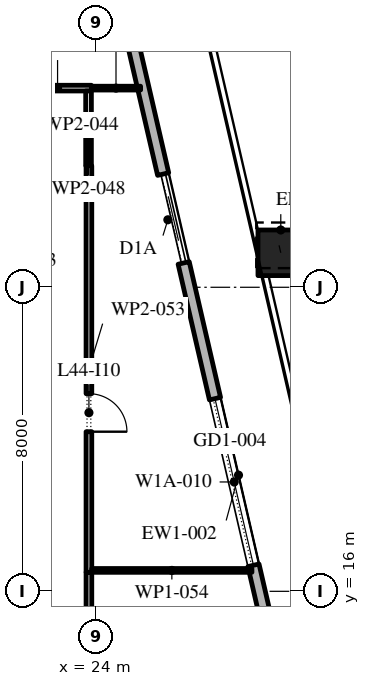
"""IFC4 building model, lengths in metres.
Left out: names, types, materials, properties, quantities, classifications, styles, units other than length and angle.
Written with IfcOpenShell. Run it as: python <this file> out.ifc"""

import sys

from ifc_helpers import new_model, si_unit, direction, frame, frame_2d, origin, origin_2d, place, context, subcontext, project, spatial, rectangle, extrude, element, fill, save


model = new_model("IFC4")
c1 = context("Model", 3, precision=1e-05, world=origin(), true_north=direction((0.0, 1.0)))
c2 = subcontext(c1, "Body", "Model", "MODEL_VIEW")
j1 = project(units=[si_unit("LENGTHUNIT", "METRE"), si_unit("PLANEANGLEUNIT", "RADIAN")], contexts=[c1])
p1 = place(None, origin())
s1 = spatial("IfcSite", under=j1, at=p1, CompositionType="ELEMENT")
p2 = place(p1, origin())
s2 = spatial("IfcBuilding", under=s1, at=p2, CompositionType="ELEMENT")
p3 = place(p2, frame((0.0, 0.0, 201.0)))
s3 = spatial("IfcBuildingStorey", under=s2, at=p3, CompositionType="ELEMENT", Elevation=201.0)
p4 = place(p3, frame((28.848, 24.907, 0.0), z_axis=(-0.010799590338, 0.046798224797, 0.998845981623), x_axis=(-0.974391195695, -0.224859506699, 0.0)))
e1 = element("IfcColumn", 1, at=p4, inside=s3, PredefinedType="COLUMN", context=c2, shape_type="SweptSolid", body=[
    extrude(rectangle(XDim=1.2, YDim=1.2, at=origin_2d()), origin(), (0.0, 0.0, 1.0), 4.205),
])
p5 = place(p3, frame((33.157, -5.092, 0.0), z_axis=(0.0, 0.0, 1.0), x_axis=(-0.224950279389, 0.974370243697, 0.0)))
e2 = element("IfcWall", 2, at=p5, inside=s3, PredefinedType="STANDARD", context=c2, shape_type="SweptSolid", body=[
    extrude(rectangle(XDim=49.5, YDim=0.3, at=frame_2d((24.75, 0.0))), origin(), (0.0, 0.0, 1.0), 4.0),
])
p6 = place(p5, frame((2.207, 0.0, 0.0)))
e3 = element("IfcOpeningElement", 3, at=p6, cuts=e2, PredefinedType="OPENING", context=c2, shape_type="SweptSolid", body=[
    extrude(rectangle(XDim=2.4, YDim=3.125, at=frame_2d((1.2, 1.562))), frame((0.0, 0.16, 0.0), z_axis=(0.0, -1.0, 0.0), x_axis=(1.0, 0.0, 0.0)), (0.0, 0.0, 1.0), 0.32),
])
p7 = place(p5, frame((8.121, 0.0, 0.45)))
e4 = element("IfcOpeningElement", 4, at=p7, cuts=e2, PredefinedType="OPENING", context=c2, shape_type="SweptSolid", body=[
    extrude(rectangle(XDim=4.5, YDim=2.875, at=frame_2d((2.25, 1.438))), frame((0.0, 0.16, 0.0), z_axis=(0.0, -1.0, 0.0), x_axis=(1.0, 0.0, 0.0)), (0.0, 0.0, 1.0), 0.32),
])
p8 = place(p5, frame((15.236, 0.0, 0.45)))
e5 = element("IfcOpeningElement", 5, at=p8, cuts=e2, PredefinedType="OPENING", context=c2, shape_type="SweptSolid", body=[
    extrude(rectangle(XDim=4.5, YDim=2.875, at=frame_2d((2.25, 1.438))), frame((0.0, 0.16, 0.0), z_axis=(0.0, -1.0, 0.0), x_axis=(1.0, 0.0, 0.0)), (0.0, 0.0, 1.0), 0.32),
])
p9 = place(p5, frame((22.35, 0.0, 0.45)))
e6 = element("IfcOpeningElement", 6, at=p9, cuts=e2, PredefinedType="OPENING", context=c2, shape_type="SweptSolid", body=[
    extrude(rectangle(XDim=4.5, YDim=3.0, at=frame_2d((2.25, 1.5))), frame((0.0, 0.16, 0.0), z_axis=(0.0, -1.0, 0.0), x_axis=(1.0, 0.0, 0.0)), (0.0, 0.0, 1.0), 0.32),
])
p10 = place(p5, frame((30.514, 0.0, 0.0)))
e7 = element("IfcOpeningElement", 7, at=p10, cuts=e2, PredefinedType="OPENING", context=c2, shape_type="SweptSolid", body=[
    extrude(rectangle(XDim=2.4, YDim=3.45, at=frame_2d((1.2, 1.725))), frame((0.0, 0.16, 0.0), z_axis=(0.0, -1.0, 0.0), x_axis=(1.0, 0.0, 0.0)), (0.0, 0.0, 1.0), 0.32),
])
p11 = place(p5, frame((36.579, 0.0, 0.45)))
e8 = element("IfcOpeningElement", 8, at=p11, cuts=e2, PredefinedType="OPENING", context=c2, shape_type="SweptSolid", body=[
    extrude(rectangle(XDim=4.5, YDim=3.05, at=frame_2d((2.25, 1.525))), frame((0.0, 0.16, 0.0), z_axis=(0.0, -1.0, 0.0), x_axis=(1.0, 0.0, 0.0)), (0.0, 0.0, 1.0), 0.32),
])
p12 = place(p5, frame((43.693, 0.0, 0.45)))
e9 = element("IfcOpeningElement", 9, at=p12, cuts=e2, PredefinedType="OPENING", context=c2, shape_type="SweptSolid", body=[
    extrude(rectangle(XDim=4.5, YDim=3.05, at=frame_2d((2.25, 1.525))), frame((0.0, 0.16, 0.0), z_axis=(0.0, -1.0, 0.0), x_axis=(1.0, 0.0, 0.0)), (0.0, 0.0, 1.0), 0.32),
])
p13 = place(p3, frame((22.085, 29.24, 0.0), z_axis=(0.0, 0.0, 1.0), x_axis=(1.0, 0.0, 0.0)))
e10 = element("IfcWall", 10, at=p13, inside=s3, PredefinedType="PARTITIONING", context=c2, shape_type="SweptSolid", body=[
    extrude(rectangle(XDim=1.78, YDim=0.15, at=frame_2d((0.89, 0.0))), origin(), (0.0, 0.0, 1.0), 4.0),
])
p14 = place(p3, frame((23.79, 29.165, 0.0), z_axis=(0.0, 0.0, 1.0), x_axis=(0.0, -1.0, 0.0)))
e11 = element("IfcWall", 11, at=p14, inside=s3, PredefinedType="PARTITIONING", context=c2, shape_type="SweptSolid", body=[
    extrude(rectangle(XDim=1.965, YDim=0.15, at=frame_2d((0.982, 0.0))), origin(), (0.0, 0.0, 1.0), 4.0),
])
p15 = place(p3, frame((23.865, 29.24, 0.0), z_axis=(0.0, 0.0, 1.0), x_axis=(1.0, 0.0, 0.0)))
e12 = element("IfcWall", 12, at=p15, inside=s3, PredefinedType="PARTITIONING", context=c2, shape_type="SweptSolid", body=[
    extrude(rectangle(XDim=1.295, YDim=0.1, at=frame_2d((0.647, 0.0))), origin(), (0.0, 0.0, 1.0), 4.0),
])
p16 = place(p3, frame((23.8, 16.5, 0.0), z_axis=(0.0, 0.0, 1.0), x_axis=(0.0, -1.0, 0.0)))
e13 = element("IfcWall", 13, at=p16, inside=s3, PredefinedType="PARTITIONING", context=c2, shape_type="SweptSolid", body=[
    extrude(rectangle(XDim=6.93, YDim=0.15, at=frame_2d((3.465, 0.0))), origin(), (0.0, 0.0, 1.0), 4.0),
])
p17 = place(p16, frame((2.98, 0.0, 0.0)))
e14 = element("IfcOpeningElement", 14, at=p17, cuts=e13, PredefinedType="OPENING", context=c2, shape_type="SweptSolid", body=[
    extrude(rectangle(XDim=1.0, YDim=2.1, at=frame_2d((0.5, 1.05))), frame((0.0, 0.085, 0.0), z_axis=(0.0, -1.0, 0.0), x_axis=(1.0, 0.0, 0.0)), (0.0, 0.0, 1.0), 0.17),
])
p18 = place(p3, frame((23.8, 27.2, 0.0), z_axis=(0.0, 0.0, 1.0), x_axis=(0.0, -1.0, 0.0)))
e15 = element("IfcWall", 15, at=p18, inside=s3, PredefinedType="PARTITIONING", context=c2, shape_type="SweptSolid", body=[
    extrude(rectangle(XDim=10.7, YDim=0.15, at=frame_2d((5.35, 0.0))), origin(), (0.0, 0.0, 1.0), 4.0),
])
p19 = place(p18, frame((6.0, 0.0, 0.0)))
e16 = element("IfcOpeningElement", 16, at=p19, cuts=e15, PredefinedType="OPENING", context=c2, shape_type="SweptSolid", body=[
    extrude(rectangle(XDim=1.0, YDim=2.1, at=frame_2d((0.5, 1.05))), frame((0.0, 0.085, 0.0), z_axis=(0.0, -1.0, 0.0), x_axis=(1.0, 0.0, 0.0)), (0.0, 0.0, 1.0), 0.17),
])
p20 = place(p3, frame((28.089, 16.55, 0.0), z_axis=(0.0, 0.0, 1.0), x_axis=(-1.0, 0.0, 0.0)))
e17 = element("IfcWall", 17, at=p20, inside=s3, PredefinedType="PARTITIONING", context=c2, shape_type="SweptSolid", body=[
    extrude(rectangle(XDim=4.214, YDim=0.1, at=frame_2d((2.107, 0.0))), origin(), (0.0, 0.0, 1.0), 4.0),
])
p21 = place(p9, origin())
e18 = element("IfcWindow", 18, at=p21, inside=s3, PartitioningType="DOUBLE_PANEL_VERTICAL", PredefinedType="WINDOW", context=c2, shape_type="SweptSolid", body=[
    extrude(rectangle(XDim=4.5, YDim=3.0, at=frame_2d((2.25, 1.5))), frame((0.0, 0.03, 0.0), z_axis=(0.0, -1.0, 0.0), x_axis=(1.0, 0.0, 0.0)), (0.0, 0.0, 1.0), 0.06),
])
fill(e6, e18)
p22 = place(p10, origin())
e19 = element("IfcDoor", 19, at=p22, inside=s3, OperationType="DOUBLE_DOOR_SLIDING", PredefinedType="DOOR", context=c2, shape_type="SweptSolid", body=[
    extrude(rectangle(XDim=2.4, YDim=3.45, at=frame_2d((1.2, 1.725))), frame((0.0, 0.025, 0.0), z_axis=(0.0, -1.0, 0.0), x_axis=(1.0, 0.0, 0.0)), (0.0, 0.0, 1.0), 0.05),
])
fill(e7, e19)
p23 = place(p19, origin())
e20 = element("IfcDoor", 20, at=p23, inside=s3, OperationType="SINGLE_SWING_LEFT", PredefinedType="DOOR", context=c2, shape_type="SweptSolid", body=[
    extrude(rectangle(XDim=1.0, YDim=2.1, at=frame_2d((0.5, 1.05))), frame((0.0, 0.025, 0.0), z_axis=(0.0, -1.0, 0.0), x_axis=(1.0, 0.0, 0.0)), (0.0, 0.0, 1.0), 0.05),
])
fill(e16, e20)
save(model, sys.argv[1])
